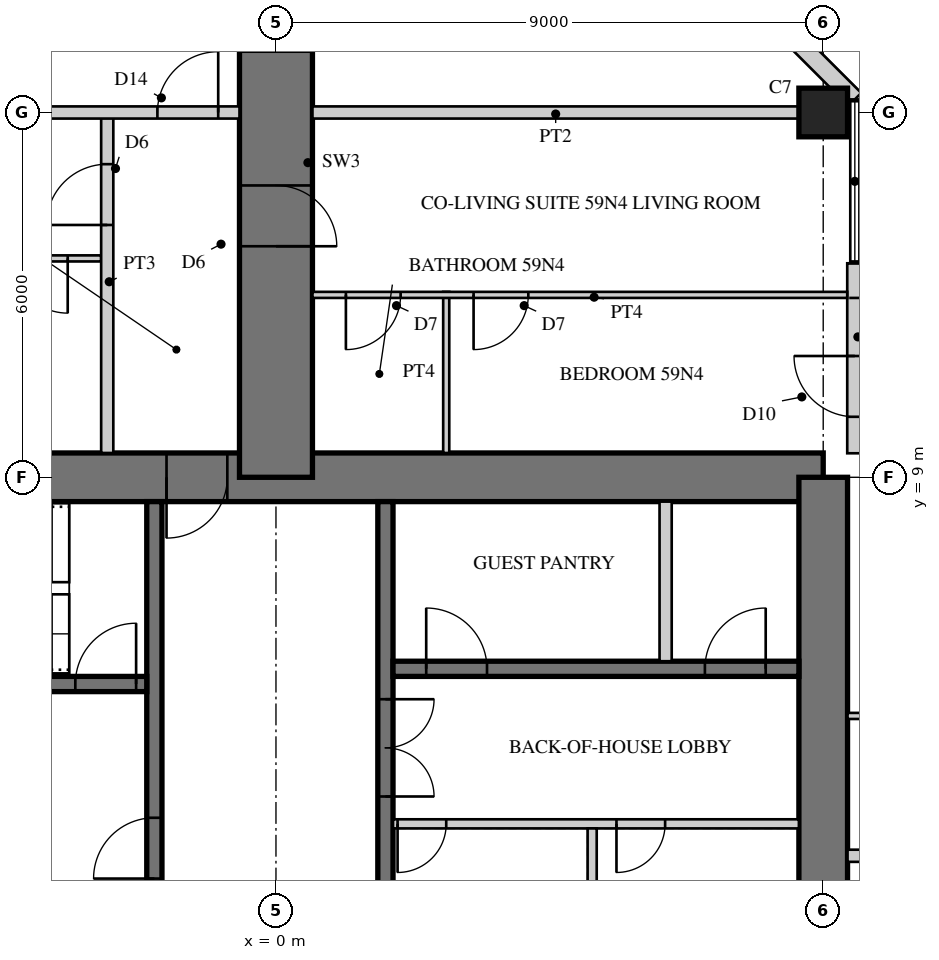
"""IFC4 building model, lengths in metres.
Left out: names, types, materials, properties, quantities, classifications, styles, units other than length and angle.
Written with IfcOpenShell. Run it as: python <this file> out.ifc"""

import sys

from ifc_helpers import new_model, si_unit, direction, frame, frame_2d, origin, origin_2d, place, context, subcontext, project, spatial, rectangle, hollow_rectangle, extrude, element, fill, save


model = new_model("IFC4")
c1 = context("Model", 3, precision=1e-05, world=origin(), true_north=direction((0.0, 1.0)))
c2 = subcontext(c1, "Body", "Model", "MODEL_VIEW")
j1 = project(units=[si_unit("LENGTHUNIT", "METRE"), si_unit("PLANEANGLEUNIT", "RADIAN")], contexts=[c1])
p1 = place(None, origin())
s1 = spatial("IfcSite", under=j1, at=p1, CompositionType="ELEMENT")
p2 = place(p1, origin())
s2 = spatial("IfcBuilding", under=s1, at=p2, CompositionType="ELEMENT")
p3 = place(p2, frame((0.0, 0.0, 232.3)))
s3 = spatial("IfcBuildingStorey", under=s2, at=p3, CompositionType="ELEMENT", Elevation=232.3)
p4 = place(p3, frame((9.0, 9.0, 0.0), z_axis=(0.0, 0.0, 1.0), x_axis=(-1.0, 0.0, 0.0)))
e1 = element("IfcWall", 1, at=p4, inside=s3, PredefinedType="SHEAR", context=c2, shape_type="SweptSolid", body=[
    extrude(rectangle(XDim=18.0, YDim=0.8, at=frame_2d((9.0, 0.0))), origin(), (0.0, 0.0, 1.0), 3.4),
])
p5 = place(p4, frame((9.8, 0.0, 0.0)))
e2 = element("IfcOpeningElement", 2, at=p5, cuts=e1, PredefinedType="OPENING", context=c2, shape_type="SweptSolid", body=[
    extrude(rectangle(XDim=1.0, YDim=2.4, at=frame_2d((0.5, 1.2))), frame((0.0, 0.41, 0.0), z_axis=(0.0, -1.0, 0.0), x_axis=(1.0, 0.0, 0.0)), (0.0, 0.0, 1.0), 0.82),
])
p6 = place(p3, frame((9.0, -9.0, 0.0), z_axis=(0.0, 0.0, 1.0), x_axis=(0.0, 1.0, 0.0)))
e3 = element("IfcWall", 3, at=p6, inside=s3, PredefinedType="SHEAR", context=c2, shape_type="SweptSolid", body=[
    extrude(rectangle(XDim=18.0, YDim=0.8, at=frame_2d((9.0, 0.0))), origin(), (0.0, 0.0, 1.0), 3.4),
])
p7 = place(p6, frame((9.8, 0.0, 0.0)))
e4 = element("IfcOpeningElement", 4, at=p7, cuts=e3, PredefinedType="OPENING", context=c2, shape_type="SweptSolid", body=[
    extrude(rectangle(XDim=1.0, YDim=2.4, at=frame_2d((0.5, 1.2))), frame((0.0, 0.41, 0.0), z_axis=(0.0, -1.0, 0.0), x_axis=(1.0, 0.0, 0.0)), (0.0, 0.0, 1.0), 0.82),
])
p8 = place(p3, frame((1.8, 1.875, 0.0), z_axis=(0.0, 0.0, 1.0), x_axis=(0.0, 1.0, 0.0)))
e5 = element("IfcWall", 5, at=p8, inside=s3, PredefinedType="SHEAR", context=c2, shape_type="SweptSolid", body=[
    extrude(rectangle(XDim=6.725, YDim=0.25, at=frame_2d((3.363, 0.0))), origin(), (0.0, 0.0, 1.0), 3.4),
])
p9 = place(p8, frame((1.875, 0.0, 0.0)))
e6 = element("IfcOpeningElement", 6, at=p9, cuts=e5, PredefinedType="OPENING", context=c2, shape_type="SweptSolid", body=[
    extrude(rectangle(XDim=1.6, YDim=2.4, at=frame_2d((0.8, 1.2))), frame((0.0, 0.135, 0.0), z_axis=(0.0, -1.0, 0.0), x_axis=(1.0, 0.0, 0.0)), (0.0, 0.0, 1.0), 0.27),
])
p10 = place(p3, frame((1.925, 5.85, 0.0), z_axis=(0.0, 0.0, 1.0), x_axis=(1.0, 0.0, 0.0)))
e7 = element("IfcWall", 7, at=p10, inside=s3, PredefinedType="SHEAR", context=c2, shape_type="SweptSolid", body=[
    extrude(rectangle(XDim=6.675, YDim=0.25, at=frame_2d((3.337, 0.0))), origin(), (0.0, 0.0, 1.0), 3.4),
])
p11 = place(p10, frame((0.546, 0.0, 0.0)))
e8 = element("IfcOpeningElement", 8, at=p11, cuts=e7, PredefinedType="OPENING", context=c2, shape_type="SweptSolid", body=[
    extrude(rectangle(XDim=1.0, YDim=2.1, at=frame_2d((0.5, 1.05))), frame((0.0, 0.135, 0.0), z_axis=(0.0, -1.0, 0.0), x_axis=(1.0, 0.0, 0.0)), (0.0, 0.0, 1.0), 0.27),
])
p12 = place(p10, frame((5.129, 0.0, 0.0)))
e9 = element("IfcOpeningElement", 9, at=p12, cuts=e7, PredefinedType="OPENING", context=c2, shape_type="SweptSolid", body=[
    extrude(rectangle(XDim=1.0, YDim=2.1, at=frame_2d((0.5, 1.05))), frame((0.0, 0.135, 0.0), z_axis=(0.0, -1.0, 0.0), x_axis=(1.0, 0.0, 0.0)), (0.0, 0.0, 1.0), 0.27),
])
p13 = place(p3, frame((1.925, 3.3, 0.0), z_axis=(0.0, 0.0, 1.0), x_axis=(1.0, 0.0, 0.0)))
e10 = element("IfcWall", 10, at=p13, inside=s3, PredefinedType="PARTITIONING", context=c2, shape_type="SweptSolid", body=[
    extrude(rectangle(XDim=6.675, YDim=0.15, at=frame_2d((3.337, 0.0))), origin(), (0.0, 0.0, 1.0), 3.4),
])
p14 = place(p13, frame((0.075, 0.0, 0.0)))
e11 = element("IfcOpeningElement", 11, at=p14, cuts=e10, PredefinedType="OPENING", context=c2, shape_type="SweptSolid", body=[
    extrude(rectangle(XDim=0.8, YDim=2.1, at=frame_2d((0.4, 1.05))), frame((0.0, 0.085, 0.0), z_axis=(0.0, -1.0, 0.0), x_axis=(1.0, 0.0, 0.0)), (0.0, 0.0, 1.0), 0.17),
])
p15 = place(p13, frame((3.675, 0.0, 0.0)))
e12 = element("IfcOpeningElement", 12, at=p15, cuts=e10, PredefinedType="OPENING", context=c2, shape_type="SweptSolid", body=[
    extrude(rectangle(XDim=0.8, YDim=2.1, at=frame_2d((0.4, 1.05))), frame((0.0, 0.085, 0.0), z_axis=(0.0, -1.0, 0.0), x_axis=(1.0, 0.0, 0.0)), (0.0, 0.0, 1.0), 0.17),
])
p16 = place(p3, frame((5.2, 2.125, 0.0), z_axis=(0.0, 0.0, 1.0), x_axis=(0.0, 1.0, 0.0)))
e13 = element("IfcWall", 13, at=p16, inside=s3, PredefinedType="PARTITIONING", context=c2, shape_type="SweptSolid", body=[
    extrude(rectangle(XDim=1.1, YDim=0.15, at=frame_2d((0.55, 0.0))), origin(), (0.0, 0.0, 1.0), 3.4),
])
p17 = place(p3, frame((6.408, 5.975, 0.0), z_axis=(0.0, 0.0, 1.0), x_axis=(0.0, 1.0, 0.0)))
e14 = element("IfcWall", 14, at=p17, inside=s3, PredefinedType="PARTITIONING", context=c2, shape_type="SweptSolid", body=[
    extrude(rectangle(XDim=2.625, YDim=0.2, at=frame_2d((1.312, 0.0))), origin(), (0.0, 0.0, 1.0), 3.4),
])
p18 = place(p3, frame((-2.0, 1.675, 0.0), z_axis=(0.0, 0.0, 1.0), x_axis=(0.0, 1.0, 0.0)))
e15 = element("IfcWall", 15, at=p18, inside=s3, PredefinedType="SHEAR", context=c2, shape_type="SweptSolid", body=[
    extrude(rectangle(XDim=6.925, YDim=0.25, at=frame_2d((3.462, 0.0))), origin(), (0.0, 0.0, 1.0), 3.4),
])
p19 = place(p18, frame((0.725, 0.0, 0.0)))
e16 = element("IfcOpeningElement", 16, at=p19, cuts=e15, PredefinedType="OPENING", context=c2, shape_type="SweptSolid", body=[
    extrude(rectangle(XDim=1.0, YDim=2.1, at=frame_2d((0.5, 1.05))), frame((0.0, 0.135, 0.0), z_axis=(0.0, -1.0, 0.0), x_axis=(1.0, 0.0, 0.0)), (0.0, 0.0, 1.0), 0.27),
])
p20 = place(p3, frame((-2.125, 5.6, 0.0), z_axis=(0.0, 0.0, 1.0), x_axis=(-1.0, 0.0, 0.0)))
e17 = element("IfcWall", 17, at=p20, inside=s3, PredefinedType="SHEAR", context=c2, shape_type="SweptSolid", body=[
    extrude(rectangle(XDim=6.475, YDim=0.25, at=frame_2d((3.238, 0.0))), origin(), (0.0, 0.0, 1.0), 3.4),
])
p21 = place(p20, frame((0.175, 0.0, 0.0)))
e18 = element("IfcOpeningElement", 18, at=p21, cuts=e17, PredefinedType="OPENING", context=c2, shape_type="SweptSolid", body=[
    extrude(rectangle(XDim=1.0, YDim=2.1, at=frame_2d((0.5, 1.05))), frame((0.0, 0.135, 0.0), z_axis=(0.0, -1.0, 0.0), x_axis=(1.0, 0.0, 0.0)), (0.0, 0.0, 1.0), 0.27),
])
p22 = place(p3, frame((0.0, 9.0, 0.0), z_axis=(0.0, 0.0, 1.0), x_axis=(0.0, 1.0, 0.0)))
e19 = element("IfcWall", 19, at=p22, inside=s3, PredefinedType="SHEAR", context=c2, shape_type="SweptSolid", body=[
    extrude(rectangle(XDim=9.0, YDim=1.2, at=frame_2d((4.5, 0.0))), origin(), (0.0, 0.0, 1.0), 3.4),
])
p23 = place(p22, frame((3.8, 0.0, 0.0)))
e20 = element("IfcOpeningElement", 20, at=p23, cuts=e19, PredefinedType="OPENING", context=c2, shape_type="SweptSolid", body=[
    extrude(rectangle(XDim=1.0, YDim=2.15, at=frame_2d((0.5, 1.075))), frame((0.0, 0.61, 0.0), z_axis=(0.0, -1.0, 0.0), x_axis=(1.0, 0.0, 0.0)), (0.0, 0.0, 1.0), 1.22),
])
p24 = place(p22, frame((7.0, 0.0, 0.0)))
e21 = element("IfcOpeningElement", 21, at=p24, cuts=e19, PredefinedType="OPENING", context=c2, shape_type="SweptSolid", body=[
    extrude(rectangle(XDim=1.0, YDim=2.2, at=frame_2d((0.5, 1.1))), frame((0.0, 0.61, 0.0), z_axis=(0.0, -1.0, 0.0), x_axis=(1.0, 0.0, 0.0)), (0.0, 0.0, 1.0), 1.22),
])
p25 = place(p3, frame((9.0, 15.0, 0.0), z_axis=(0.0, 0.0, 1.0), x_axis=(1.0, 0.0, 0.0)))
e22 = element("IfcColumn", 22, at=p25, inside=s3, PredefinedType="COLUMN", context=c2, shape_type="SweptSolid", body=[
    extrude(rectangle(XDim=0.8, YDim=0.8, at=origin_2d()), origin(), (0.0, 0.0, 1.0), 3.4),
])
p26 = place(p3, frame((9.52, 9.395, 0.0), z_axis=(0.0, 0.0, 1.0), x_axis=(0.0, 1.0, 0.0)))
e23 = element("IfcWall", 23, at=p26, inside=s3, PredefinedType="SOLIDWALL", context=c2, shape_type="SweptSolid", body=[
    extrude(rectangle(XDim=3.125, YDim=0.25, at=frame_2d((1.562, 0.0))), origin(), (0.0, 0.0, 1.0), 3.22),
])
p27 = place(p26, frame((0.6, 0.0, 0.0)))
e24 = element("IfcOpeningElement", 24, at=p27, cuts=e23, PredefinedType="OPENING", context=c2, shape_type="SweptSolid", body=[
    extrude(rectangle(XDim=1.0, YDim=2.2, at=frame_2d((0.5, 1.1))), frame((0.0, 0.135, 0.0), z_axis=(0.0, -1.0, 0.0), x_axis=(1.0, 0.0, 0.0)), (0.0, 0.0, 1.0), 0.27),
])
p28 = place(p3, frame((9.52, 15.215, 0.0), z_axis=(0.0, 0.0, 1.0), x_axis=(-0.707081278264, 0.707132283189, 0.0)))
e25 = element("IfcWall", 25, at=p28, inside=s3, PredefinedType="SOLIDWALL", context=c2, shape_type="SweptSolid", body=[
    extrude(rectangle(XDim=4.787, YDim=0.3, at=frame_2d((2.393, 0.0))), origin(), (0.0, 0.0, 1.0), 3.22),
])
p29 = place(p28, frame((1.943, 0.0, 0.3)))
e26 = element("IfcOpeningElement", 26, at=p29, cuts=e25, PredefinedType="OPENING", context=c2, shape_type="SweptSolid", body=[
    extrude(rectangle(XDim=0.9, YDim=2.4, at=frame_2d((0.45, 1.2))), frame((0.0, 0.16, 0.0), z_axis=(0.0, -1.0, 0.0), x_axis=(1.0, 0.0, 0.0)), (0.0, 0.0, 1.0), 0.32),
])
p30 = place(p3, frame((-2.875, 12.6, 0.0), z_axis=(0.0, 0.0, 1.0), x_axis=(-1.0, 0.0, 0.0)))
e27 = element("IfcWall", 27, at=p30, inside=s3, PredefinedType="PARTITIONING", context=c2, shape_type="SweptSolid", body=[
    extrude(rectangle(XDim=6.605, YDim=0.1, at=frame_2d((3.302, 0.0))), origin(), (0.0, 0.0, 1.0), 3.22),
])
p31 = place(p30, frame((0.55, 0.0, 0.0)))
e28 = element("IfcOpeningElement", 28, at=p31, cuts=e27, PredefinedType="OPENING", context=c2, shape_type="SweptSolid", body=[
    extrude(rectangle(XDim=0.9, YDim=2.1, at=frame_2d((0.45, 1.05))), frame((0.0, 0.06, 0.0), z_axis=(0.0, -1.0, 0.0), x_axis=(1.0, 0.0, 0.0)), (0.0, 0.0, 1.0), 0.12),
])
p32 = place(p30, frame((2.65, 0.0, 0.0)))
e29 = element("IfcOpeningElement", 29, at=p32, cuts=e27, PredefinedType="OPENING", context=c2, shape_type="SweptSolid", body=[
    extrude(rectangle(XDim=0.9, YDim=2.1, at=frame_2d((0.45, 1.05))), frame((0.0, 0.06, 0.0), z_axis=(0.0, -1.0, 0.0), x_axis=(1.0, 0.0, 0.0)), (0.0, 0.0, 1.0), 0.12),
])
p33 = place(p3, frame((2.8, 9.4, 0.0), z_axis=(0.0, 0.0, 1.0), x_axis=(0.0, 1.0, 0.0)))
e30 = element("IfcWall", 30, at=p33, inside=s3, PredefinedType="PARTITIONING", context=c2, shape_type="SweptSolid", body=[
    extrude(rectangle(XDim=2.65, YDim=0.1, at=frame_2d((1.325, 0.0))), origin(), (0.0, 0.0, 1.0), 3.22),
])
p34 = place(p3, frame((9.395, 12.0, 0.0), z_axis=(0.0, 0.0, 1.0), x_axis=(-1.0, 0.0, 0.0)))
e31 = element("IfcWall", 31, at=p34, inside=s3, PredefinedType="PARTITIONING", context=c2, shape_type="SweptSolid", body=[
    extrude(rectangle(XDim=8.795, YDim=0.1, at=frame_2d((4.397, 0.0))), origin(), (0.0, 0.0, 1.0), 3.22),
])
p35 = place(p34, frame((5.245, 0.0, 0.0)))
e32 = element("IfcOpeningElement", 32, at=p35, cuts=e31, PredefinedType="OPENING", context=c2, shape_type="SweptSolid", body=[
    extrude(rectangle(XDim=0.9, YDim=2.1, at=frame_2d((0.45, 1.05))), frame((0.0, 0.06, 0.0), z_axis=(0.0, -1.0, 0.0), x_axis=(1.0, 0.0, 0.0)), (0.0, 0.0, 1.0), 0.12),
])
p36 = place(p34, frame((7.345, 0.0, 0.0)))
e33 = element("IfcOpeningElement", 33, at=p36, cuts=e31, PredefinedType="OPENING", context=c2, shape_type="SweptSolid", body=[
    extrude(rectangle(XDim=0.9, YDim=2.1, at=frame_2d((0.45, 1.05))), frame((0.0, 0.06, 0.0), z_axis=(0.0, -1.0, 0.0), x_axis=(1.0, 0.0, 0.0)), (0.0, 0.0, 1.0), 0.12),
])
p37 = place(p3, frame((-2.775, 9.4, 0.0), z_axis=(0.0, 0.0, 1.0), x_axis=(0.0, 1.0, 0.0)))
e34 = element("IfcWall", 34, at=p37, inside=s3, PredefinedType="SOLIDWALL", context=c2, shape_type="SweptSolid", body=[
    extrude(rectangle(XDim=5.6, YDim=0.2, at=frame_2d((2.8, 0.0))), origin(), (0.0, 0.0, 1.0), 3.22),
])
p38 = place(p37, frame((3.75, 0.0, 0.0)))
e35 = element("IfcOpeningElement", 35, at=p38, cuts=e34, PredefinedType="OPENING", context=c2, shape_type="SweptSolid", body=[
    extrude(rectangle(XDim=1.0, YDim=2.15, at=frame_2d((0.5, 1.075))), frame((0.0, 0.11, 0.0), z_axis=(0.0, -1.0, 0.0), x_axis=(1.0, 0.0, 0.0)), (0.0, 0.0, 1.0), 0.22),
])
p39 = place(p3, frame((8.6, 15.0, 0.0), z_axis=(0.0, 0.0, 1.0), x_axis=(-1.0, 0.0, 0.0)))
e36 = element("IfcWall", 36, at=p39, inside=s3, PredefinedType="SOLIDWALL", context=c2, shape_type="SweptSolid", body=[
    extrude(rectangle(XDim=8.0, YDim=0.2, at=frame_2d((4.0, 0.0))), origin(), (0.0, 0.0, 1.0), 2.52),
])
p40 = place(p3, frame((-0.6, 15.0, 0.0), z_axis=(0.0, 0.0, 1.0), x_axis=(-1.0, 0.0, 0.0)))
e37 = element("IfcWall", 37, at=p40, inside=s3, PredefinedType="SOLIDWALL", context=c2, shape_type="SweptSolid", body=[
    extrude(rectangle(XDim=8.0, YDim=0.2, at=frame_2d((4.0, 0.0))), origin(), (0.0, 0.0, 1.0), 2.52),
])
p41 = place(p40, frame((0.35, 0.0, 0.0)))
e38 = element("IfcOpeningElement", 38, at=p41, cuts=e37, PredefinedType="OPENING", context=c2, shape_type="SweptSolid", body=[
    extrude(rectangle(XDim=1.0, YDim=2.2, at=frame_2d((0.5, 1.1))), frame((0.0, 0.11, 0.0), z_axis=(0.0, -1.0, 0.0), x_axis=(1.0, 0.0, 0.0)), (0.0, 0.0, 1.0), 0.22),
])
p42 = place(p3, frame((9.4, 5.075, 0.0), z_axis=(0.0, 0.0, 1.0), x_axis=(1.0, 0.0, 0.0)))
e39 = element("IfcWall", 39, at=p42, inside=s3, PredefinedType="PARTITIONING", context=c2, shape_type="SweptSolid", body=[
    extrude(rectangle(XDim=3.25, YDim=0.1, at=frame_2d((1.625, 0.0))), origin(), (0.0, 0.0, 1.0), 3.22),
])
p43 = place(p3, frame((9.4, 2.775, 0.0), z_axis=(0.0, 0.0, 1.0), x_axis=(1.0, 0.0, 0.0)))
e40 = element("IfcWall", 40, at=p43, inside=s3, PredefinedType="SOLIDWALL", context=c2, shape_type="SweptSolid", body=[
    extrude(rectangle(XDim=5.6, YDim=0.2, at=frame_2d((2.8, 0.0))), origin(), (0.0, 0.0, 1.0), 3.22),
])
p44 = place(p43, frame((3.75, 0.0, 0.0)))
e41 = element("IfcOpeningElement", 41, at=p44, cuts=e40, PredefinedType="OPENING", context=c2, shape_type="SweptSolid", body=[
    extrude(rectangle(XDim=1.0, YDim=2.15, at=frame_2d((0.5, 1.075))), frame((0.0, 0.11, 0.0), z_axis=(0.0, -1.0, 0.0), x_axis=(1.0, 0.0, 0.0)), (0.0, 0.0, 1.0), 0.22),
])
p45 = place(p27, origin())
e42 = element("IfcDoor", 42, at=p45, inside=s3, OperationType="SINGLE_SWING_RIGHT", PredefinedType="DOOR", context=c2, shape_type="SweptSolid", body=[
    extrude(hollow_rectangle(XDim=1.0, YDim=2.2, WallThickness=0.06, at=frame_2d((0.5, 1.1))), frame((0.0, 0.025, 0.0), z_axis=(0.0, -1.0, 0.0), x_axis=(1.0, 0.0, 0.0)), (0.0, 0.0, 1.0), 0.05),
    extrude(rectangle(XDim=0.879, YDim=2.079, at=frame_2d((0.5, 1.1))), frame((0.0, 0.025, 0.0), z_axis=(0.0, -1.0, 0.0), x_axis=(1.0, 0.0, 0.0)), (0.0, 0.0, 1.0), 0.05),
])
fill(e24, e42)
p46 = place(p31, origin())
e43 = element("IfcDoor", 43, at=p46, inside=s3, OperationType="SINGLE_SWING_LEFT", PredefinedType="DOOR", context=c2, shape_type="SweptSolid", body=[
    extrude(rectangle(XDim=0.9, YDim=2.1, at=frame_2d((0.45, 1.05))), frame((0.0, 0.025, 0.0), z_axis=(0.0, -1.0, 0.0), x_axis=(1.0, 0.0, 0.0)), (0.0, 0.0, 1.0), 0.05),
])
fill(e28, e43)
p47 = place(p35, origin())
e44 = element("IfcDoor", 44, at=p47, inside=s3, OperationType="SINGLE_SWING_RIGHT", PredefinedType="DOOR", context=c2, shape_type="SweptSolid", body=[
    extrude(rectangle(XDim=0.9, YDim=2.1, at=frame_2d((0.45, 1.05))), frame((0.0, 0.025, 0.0), z_axis=(0.0, -1.0, 0.0), x_axis=(1.0, 0.0, 0.0)), (0.0, 0.0, 1.0), 0.05),
])
fill(e32, e44)
p48 = place(p36, origin())
e45 = element("IfcDoor", 45, at=p48, inside=s3, OperationType="SINGLE_SWING_RIGHT", PredefinedType="DOOR", context=c2, shape_type="SweptSolid", body=[
    extrude(rectangle(XDim=0.9, YDim=2.1, at=frame_2d((0.45, 1.05))), frame((0.0, 0.025, 0.0), z_axis=(0.0, -1.0, 0.0), x_axis=(1.0, 0.0, 0.0)), (0.0, 0.0, 1.0), 0.05),
])
fill(e33, e45)
p49 = place(p38, origin())
e46 = element("IfcDoor", 46, at=p49, inside=s3, OperationType="SINGLE_SWING_LEFT", PredefinedType="DOOR", context=c2, shape_type="SweptSolid", body=[
    extrude(rectangle(XDim=1.0, YDim=2.15, at=frame_2d((0.5, 1.075))), frame((0.0, 0.025, 0.0), z_axis=(0.0, -1.0, 0.0), x_axis=(1.0, 0.0, 0.0)), (0.0, 0.0, 1.0), 0.05),
])
fill(e35, e46)
p50 = place(p41, frame((1.0, 0.0, 0.0), z_axis=(0.0, 0.0, 1.0), x_axis=(-1.0, 0.0, 0.0)))
e47 = element("IfcDoor", 47, at=p50, inside=s3, OperationType="SINGLE_SWING_RIGHT", PredefinedType="DOOR", context=c2, shape_type="SweptSolid", body=[
    extrude(rectangle(XDim=1.0, YDim=2.2, at=frame_2d((0.5, 1.1))), frame((0.0, 0.025, 0.0), z_axis=(0.0, -1.0, 0.0), x_axis=(1.0, 0.0, 0.0)), (0.0, 0.0, 1.0), 0.05),
])
fill(e38, e47)
p51 = place(p23, frame((1.0, 0.0, 0.0), z_axis=(0.0, 0.0, 1.0), x_axis=(-1.0, 0.0, 0.0)))
e48 = element("IfcDoor", 48, at=p51, inside=s3, OperationType="SINGLE_SWING_RIGHT", PredefinedType="DOOR", context=c2, shape_type="SweptSolid", body=[
    extrude(rectangle(XDim=1.0, YDim=2.15, at=frame_2d((0.5, 1.075))), frame((0.0, 0.025, 0.0), z_axis=(0.0, -1.0, 0.0), x_axis=(1.0, 0.0, 0.0)), (0.0, 0.0, 1.0), 0.05),
])
fill(e20, e48)
p52 = place(p5, origin())
e49 = element("IfcDoor", 49, at=p52, inside=s3, OperationType="SINGLE_SWING_RIGHT", PredefinedType="DOOR", context=c2, shape_type="SweptSolid", body=[
    extrude(rectangle(XDim=1.0, YDim=2.4, at=frame_2d((0.5, 1.2))), frame((0.0, 0.055, 0.0), z_axis=(0.0, -1.0, 0.0), x_axis=(1.0, 0.0, 0.0)), (0.0, 0.0, 1.0), 0.05),
])
fill(e2, e49)
p53 = place(p9, frame((1.6, 0.0, 0.0), z_axis=(0.0, 0.0, 1.0), x_axis=(-1.0, 0.0, 0.0)))
e50 = element("IfcDoor", 50, at=p53, inside=s3, OperationType="DOUBLE_DOOR_SINGLE_SWING", PredefinedType="DOOR", context=c2, shape_type="SweptSolid", body=[
    extrude(rectangle(XDim=1.6, YDim=2.4, at=frame_2d((0.8, 1.2))), frame((0.0, 0.025, 0.0), z_axis=(0.0, -1.0, 0.0), x_axis=(1.0, 0.0, 0.0)), (0.0, 0.0, 1.0), 0.05),
])
fill(e6, e50)
p54 = place(p14, frame((0.8, 0.0, 0.0), z_axis=(0.0, 0.0, 1.0), x_axis=(-1.0, 0.0, 0.0)))
e51 = element("IfcDoor", 51, at=p54, inside=s3, OperationType="SINGLE_SWING_RIGHT", PredefinedType="DOOR", context=c2, shape_type="SweptSolid", body=[
    extrude(rectangle(XDim=0.8, YDim=2.1, at=frame_2d((0.4, 1.05))), frame((0.0, 0.025, 0.0), z_axis=(0.0, -1.0, 0.0), x_axis=(1.0, 0.0, 0.0)), (0.0, 0.0, 1.0), 0.05),
])
fill(e11, e51)
p55 = place(p15, frame((0.8, 0.0, 0.0), z_axis=(0.0, 0.0, 1.0), x_axis=(-1.0, 0.0, 0.0)))
e52 = element("IfcDoor", 52, at=p55, inside=s3, OperationType="SINGLE_SWING_RIGHT", PredefinedType="DOOR", context=c2, shape_type="SweptSolid", body=[
    extrude(rectangle(XDim=0.8, YDim=2.1, at=frame_2d((0.4, 1.05))), frame((0.0, 0.025, 0.0), z_axis=(0.0, -1.0, 0.0), x_axis=(1.0, 0.0, 0.0)), (0.0, 0.0, 1.0), 0.05),
])
fill(e12, e52)
p56 = place(p19, origin())
e53 = element("IfcDoor", 53, at=p56, inside=s3, OperationType="SINGLE_SWING_LEFT", PredefinedType="DOOR", context=c2, shape_type="SweptSolid", body=[
    extrude(rectangle(XDim=1.0, YDim=2.1, at=frame_2d((0.5, 1.05))), frame((0.0, 0.025, 0.0), z_axis=(0.0, -1.0, 0.0), x_axis=(1.0, 0.0, 0.0)), (0.0, 0.0, 1.0), 0.05),
])
fill(e16, e53)
p57 = place(p21, frame((1.0, 0.0, 0.0), z_axis=(0.0, 0.0, 1.0), x_axis=(-1.0, 0.0, 0.0)))
e54 = element("IfcDoor", 54, at=p57, inside=s3, OperationType="SINGLE_SWING_RIGHT", PredefinedType="DOOR", context=c2, shape_type="SweptSolid", body=[
    extrude(rectangle(XDim=1.0, YDim=2.1, at=frame_2d((0.5, 1.05))), frame((0.0, 0.025, 0.0), z_axis=(0.0, -1.0, 0.0), x_axis=(1.0, 0.0, 0.0)), (0.0, 0.0, 1.0), 0.05),
])
fill(e18, e54)
p58 = place(p11, origin())
e55 = element("IfcDoor", 55, at=p58, inside=s3, OperationType="SINGLE_SWING_LEFT", PredefinedType="DOOR", context=c2, shape_type="SweptSolid", body=[
    extrude(rectangle(XDim=1.0, YDim=2.1, at=frame_2d((0.5, 1.05))), frame((0.0, 0.025, 0.0), z_axis=(0.0, -1.0, 0.0), x_axis=(1.0, 0.0, 0.0)), (0.0, 0.0, 1.0), 0.05),
])
fill(e8, e55)
p59 = place(p12, origin())
e56 = element("IfcDoor", 56, at=p59, inside=s3, OperationType="SINGLE_SWING_RIGHT", PredefinedType="DOOR", context=c2, shape_type="SweptSolid", body=[
    extrude(rectangle(XDim=1.0, YDim=2.1, at=frame_2d((0.5, 1.05))), frame((0.0, 0.025, 0.0), z_axis=(0.0, -1.0, 0.0), x_axis=(1.0, 0.0, 0.0)), (0.0, 0.0, 1.0), 0.05),
])
fill(e9, e56)
save(model, sys.argv[1])
